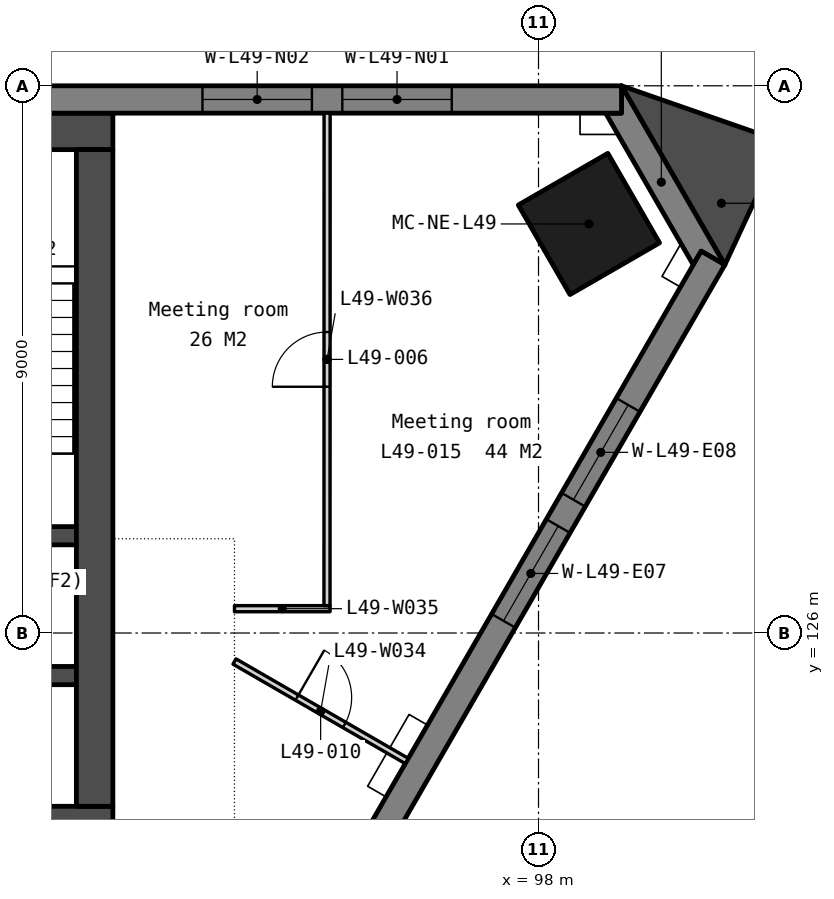
"""IFC4 building model, lengths in metres.
Left out: names, types, materials, properties, quantities, classifications, styles, units other than length and angle.
Written with IfcOpenShell. Run it as: python <this file> out.ifc"""

import sys

from ifc_helpers import new_model, si_unit, direction, frame, frame_2d, origin, origin_2d, place, context, subcontext, project, spatial, polyline, rectangle, outline, extrude, element, fill, save


model = new_model("IFC4")
c1 = context("Model", 3, precision=1e-05, world=origin(), true_north=direction((0.0, 1.0)))
c2 = subcontext(c1, "Body", "Model", "MODEL_VIEW")
j1 = project(units=[si_unit("LENGTHUNIT", "METRE"), si_unit("PLANEANGLEUNIT", "RADIAN")], contexts=[c1])
p1 = place(None, origin())
s1 = spatial("IfcSite", under=j1, at=p1, CompositionType="ELEMENT")
p2 = place(p1, origin())
s2 = spatial("IfcBuilding", under=s1, at=p2, CompositionType="ELEMENT")
p3 = place(p2, frame((0.0, 0.0, 195.8)))
s3 = spatial("IfcBuildingStorey", under=s2, at=p3, CompositionType="ELEMENT", Elevation=195.8)
p4 = place(p3, frame((98.829, 132.728, 0.0), z_axis=(0.0, 0.0, 1.0), x_axis=(-0.5, 0.866025403784, 0.0)))
e1 = element("IfcColumn", 1, at=p4, inside=s3, PredefinedType="COLUMN", context=c2, shape_type="SweptSolid", body=[
    extrude(rectangle(XDim=1.7, YDim=1.7, at=origin_2d()), origin(), (0.0, 0.0, 1.0), 3.9),
])
p5 = place(p3, frame((69.0, 134.25, 0.0), z_axis=(0.0, 0.0, 1.0), x_axis=(1.0, 0.0, 0.0)))
e2 = element("IfcWall", 2, at=p5, inside=s3, PredefinedType="SOLIDWALL", context=c2, shape_type="SweptSolid", body=[
    extrude(rectangle(XDim=22.0, YDim=0.6, at=frame_2d((11.0, 0.0))), origin(), (0.0, 0.0, 1.0), 3.75),
])
p6 = place(p3, frame((69.0, 122.85, 0.0), z_axis=(0.0, 0.0, 1.0), x_axis=(1.0, 0.0, 0.0)))
e3 = element("IfcWall", 3, at=p6, inside=s3, PredefinedType="SOLIDWALL", context=c2, shape_type="SweptSolid", body=[
    extrude(rectangle(XDim=22.0, YDim=0.6, at=frame_2d((11.0, 0.0))), origin(), (0.0, 0.0, 1.0), 3.75),
])
p7 = place(p6, frame((16.375, 0.0, 0.0)))
e4 = element("IfcOpeningElement", 4, at=p7, cuts=e3, PredefinedType="OPENING", context=c2, shape_type="SweptSolid", body=[
    extrude(rectangle(XDim=1.8, YDim=2.1, at=frame_2d((0.9, 1.05))), frame((0.0, 0.31, 0.0), z_axis=(0.0, -1.0, 0.0), x_axis=(1.0, 0.0, 0.0)), (0.0, 0.0, 1.0), 0.62),
])
p8 = place(p6, frame((3.825, 0.0, 0.0)))
e5 = element("IfcOpeningElement", 5, at=p8, cuts=e3, PredefinedType="OPENING", context=c2, shape_type="SweptSolid", body=[
    extrude(rectangle(XDim=1.8, YDim=2.1, at=frame_2d((0.9, 1.05))), frame((0.0, 0.31, 0.0), z_axis=(0.0, -1.0, 0.0), x_axis=(1.0, 0.0, 0.0)), (0.0, 0.0, 1.0), 0.62),
])
p9 = place(p6, frame((12.85, 0.0, 0.0)))
e6 = element("IfcOpeningElement", 6, at=p9, cuts=e3, PredefinedType="OPENING", context=c2, shape_type="SweptSolid", body=[
    extrude(rectangle(XDim=1.5, YDim=2.1, at=frame_2d((0.75, 1.05))), frame((0.0, 0.31, 0.0), z_axis=(0.0, -1.0, 0.0), x_axis=(1.0, 0.0, 0.0)), (0.0, 0.0, 1.0), 0.62),
])
for number, where, z_axis, x_axis in (
    (7, (87.85, 127.6, 0.0), (0.0, 0.0, 1.0), (1.0, 0.0, 0.0)),
    (8, (87.85, 125.3, 0.0), (0.0, 0.0, 1.0), (1.0, 0.0, 0.0)),
):
    element("IfcWall", number, at=place(p3, frame(where, z_axis=z_axis, x_axis=x_axis)), inside=s3, PredefinedType="SOLIDWALL", context=c2, shape_type="SweptSolid", body=[
        extrude(rectangle(XDim=2.55, YDim=0.3, at=frame_2d((1.275, 0.0))), origin(), (0.0, 0.0, 1.0), 3.75),
    ])
p10 = place(p3, frame((90.7, 133.95, 0.0), z_axis=(0.0, 0.0, 1.0), x_axis=(0.0, -1.0, 0.0)))
e9 = element("IfcWall", 9, at=p10, inside=s3, PredefinedType="SOLIDWALL", context=c2, shape_type="SweptSolid", body=[
    extrude(rectangle(XDim=10.8, YDim=0.6, at=frame_2d((5.4, 0.0))), origin(), (0.0, 0.0, 1.0), 3.75),
])
p11 = place(p3, frame((0.0, 0.0, -0.15)))
e10 = element("IfcWall", 10, at=p11, inside=s3, PredefinedType="SOLIDWALL", context=c2, shape_type="SweptSolid", body=[
    extrude(outline(polyline([(101.065, 132.055), (100.675, 132.281), (100.545, 132.055), (99.105, 134.55), (99.365, 134.55), (99.365, 135.0), (101.065, 132.055)])), origin(), (0.0, 0.0, 1.0), 3.9),
])
p12 = place(p3, frame((99.365, 134.775, -0.15), z_axis=(0.0, 0.0, 1.0), x_axis=(-1.0, 0.0, 0.0)))
e11 = element("IfcWall", 11, at=p12, inside=s3, PredefinedType="SOLIDWALL", context=c2, shape_type="SweptSolid", body=[
    extrude(outline(polyline([(0.0, 0.0), (0.0, 3.9), (31.988, 3.9), (31.988, 0.0), (0.0, 0.0)])), frame((0.0, 0.225, 0.0), z_axis=(0.0, -1.0, 0.0), x_axis=(1.0, 0.0, 0.0)), (0.0, 0.0, 1.0), 0.45),
])
p13 = place(p12, frame((2.791, 0.0, 0.95)))
e12 = element("IfcOpeningElement", 12, at=p13, cuts=e11, PredefinedType="OPENING", context=c2, shape_type="SweptSolid", body=[
    extrude(rectangle(XDim=1.8, YDim=2.2, at=frame_2d((0.9, 1.1))), frame((0.0, 0.235, 0.0), z_axis=(0.0, -1.0, 0.0), x_axis=(1.0, 0.0, 0.0)), (0.0, 0.0, 1.0), 0.47),
])
p14 = place(p12, frame((5.091, 0.0, 0.95)))
e13 = element("IfcOpeningElement", 13, at=p14, cuts=e11, PredefinedType="OPENING", context=c2, shape_type="SweptSolid", body=[
    extrude(rectangle(XDim=1.8, YDim=2.2, at=frame_2d((0.9, 1.1))), frame((0.0, 0.235, 0.0), z_axis=(0.0, -1.0, 0.0), x_axis=(1.0, 0.0, 0.0)), (0.0, 0.0, 1.0), 0.47),
])
p15 = place(p12, frame((12.473, 0.0, 0.95)))
e14 = element("IfcOpeningElement", 14, at=p15, cuts=e11, PredefinedType="OPENING", context=c2, shape_type="SweptSolid", body=[
    extrude(rectangle(XDim=1.8, YDim=2.2, at=frame_2d((0.9, 1.1))), frame((0.0, 0.235, 0.0), z_axis=(0.0, -1.0, 0.0), x_axis=(1.0, 0.0, 0.0)), (0.0, 0.0, 1.0), 0.47),
])
p16 = place(p12, frame((14.773, 0.0, 0.95)))
e15 = element("IfcOpeningElement", 15, at=p16, cuts=e11, PredefinedType="OPENING", context=c2, shape_type="SweptSolid", body=[
    extrude(rectangle(XDim=1.8, YDim=2.2, at=frame_2d((0.9, 1.1))), frame((0.0, 0.235, 0.0), z_axis=(0.0, -1.0, 0.0), x_axis=(1.0, 0.0, 0.0)), (0.0, 0.0, 1.0), 0.47),
])
p17 = place(p12, frame((22.156, 0.0, 0.95)))
e16 = element("IfcOpeningElement", 16, at=p17, cuts=e11, PredefinedType="OPENING", context=c2, shape_type="SweptSolid", body=[
    extrude(rectangle(XDim=1.8, YDim=2.2, at=frame_2d((0.9, 1.1))), frame((0.0, 0.235, 0.0), z_axis=(0.0, -1.0, 0.0), x_axis=(1.0, 0.0, 0.0)), (0.0, 0.0, 1.0), 0.47),
])
p18 = place(p12, frame((24.456, 0.0, 0.95)))
e17 = element("IfcOpeningElement", 17, at=p18, cuts=e11, PredefinedType="OPENING", context=c2, shape_type="SweptSolid", body=[
    extrude(rectangle(XDim=1.8, YDim=2.2, at=frame_2d((0.9, 1.1))), frame((0.0, 0.235, 0.0), z_axis=(0.0, -1.0, 0.0), x_axis=(1.0, 0.0, 0.0)), (0.0, 0.0, 1.0), 0.47),
])
p19 = place(p3, frame((81.505, 98.627, -0.15), z_axis=(0.0, 0.0, 1.0), x_axis=(0.500002199942, 0.866024133644, 0.0)))
e18 = element("IfcWall", 18, at=p19, inside=s3, PredefinedType="SOLIDWALL", context=c2, shape_type="SweptSolid", body=[
    extrude(outline(polyline([(38.729, 0.0), (38.729, 3.9), (0.0, 3.9), (0.0, 0.0), (38.729, 0.0)])), frame((0.0, 0.225, 0.0), z_axis=(0.0, -1.0, 0.0), x_axis=(1.0, 0.0, 0.0)), (0.0, 0.0, 1.0), 0.45),
])
p20 = place(p19, frame((2.791, 0.0, 0.95)))
e19 = element("IfcOpeningElement", 19, at=p20, cuts=e18, PredefinedType="OPENING", context=c2, shape_type="SweptSolid", body=[
    extrude(rectangle(XDim=1.8, YDim=2.2, at=frame_2d((0.9, 1.1))), frame((0.0, 0.235, 0.0), z_axis=(0.0, -1.0, 0.0), x_axis=(1.0, 0.0, 0.0)), (0.0, 0.0, 1.0), 0.47),
])
p21 = place(p19, frame((5.091, 0.0, 0.95)))
e20 = element("IfcOpeningElement", 20, at=p21, cuts=e18, PredefinedType="OPENING", context=c2, shape_type="SweptSolid", body=[
    extrude(rectangle(XDim=1.8, YDim=2.2, at=frame_2d((0.9, 1.1))), frame((0.0, 0.235, 0.0), z_axis=(0.0, -1.0, 0.0), x_axis=(1.0, 0.0, 0.0)), (0.0, 0.0, 1.0), 0.47),
])
p22 = place(p19, frame((12.473, 0.0, 0.95)))
e21 = element("IfcOpeningElement", 21, at=p22, cuts=e18, PredefinedType="OPENING", context=c2, shape_type="SweptSolid", body=[
    extrude(rectangle(XDim=1.8, YDim=2.2, at=frame_2d((0.9, 1.1))), frame((0.0, 0.235, 0.0), z_axis=(0.0, -1.0, 0.0), x_axis=(1.0, 0.0, 0.0)), (0.0, 0.0, 1.0), 0.47),
])
p23 = place(p19, frame((14.773, 0.0, 0.95)))
e22 = element("IfcOpeningElement", 22, at=p23, cuts=e18, PredefinedType="OPENING", context=c2, shape_type="SweptSolid", body=[
    extrude(rectangle(XDim=1.8, YDim=2.2, at=frame_2d((0.9, 1.1))), frame((0.0, 0.235, 0.0), z_axis=(0.0, -1.0, 0.0), x_axis=(1.0, 0.0, 0.0)), (0.0, 0.0, 1.0), 0.47),
])
p24 = place(p19, frame((22.156, 0.0, 0.95)))
e23 = element("IfcOpeningElement", 23, at=p24, cuts=e18, PredefinedType="OPENING", context=c2, shape_type="SweptSolid", body=[
    extrude(rectangle(XDim=1.8, YDim=2.2, at=frame_2d((0.9, 1.1))), frame((0.0, 0.235, 0.0), z_axis=(0.0, -1.0, 0.0), x_axis=(1.0, 0.0, 0.0)), (0.0, 0.0, 1.0), 0.47),
])
p25 = place(p19, frame((24.456, 0.0, 0.95)))
e24 = element("IfcOpeningElement", 24, at=p25, cuts=e18, PredefinedType="OPENING", context=c2, shape_type="SweptSolid", body=[
    extrude(rectangle(XDim=1.8, YDim=2.2, at=frame_2d((0.9, 1.1))), frame((0.0, 0.235, 0.0), z_axis=(0.0, -1.0, 0.0), x_axis=(1.0, 0.0, 0.0)), (0.0, 0.0, 1.0), 0.47),
])
p26 = place(p19, frame((31.838, 0.0, 0.95)))
e25 = element("IfcOpeningElement", 25, at=p26, cuts=e18, PredefinedType="OPENING", context=c2, shape_type="SweptSolid", body=[
    extrude(rectangle(XDim=1.8, YDim=2.2, at=frame_2d((0.9, 1.1))), frame((0.0, 0.235, 0.0), z_axis=(0.0, -1.0, 0.0), x_axis=(1.0, 0.0, 0.0)), (0.0, 0.0, 1.0), 0.47),
])
p27 = place(p19, frame((34.138, 0.0, 0.95)))
e26 = element("IfcOpeningElement", 26, at=p27, cuts=e18, PredefinedType="OPENING", context=c2, shape_type="SweptSolid", body=[
    extrude(rectangle(XDim=1.8, YDim=2.2, at=frame_2d((0.9, 1.1))), frame((0.0, 0.235, 0.0), z_axis=(0.0, -1.0, 0.0), x_axis=(1.0, 0.0, 0.0)), (0.0, 0.0, 1.0), 0.47),
])
p28 = place(p3, frame((0.0, 0.0, -0.15)))
e27 = element("IfcWall", 27, at=p28, inside=s3, PredefinedType="SOLIDWALL", context=c2, shape_type="SweptSolid", body=[
    extrude(outline(polyline([(101.065, 132.055), (102.006, 134.081), (99.365, 135.0), (101.065, 132.055)])), origin(), (0.0, 0.0, 1.0), 3.9),
])
p29 = place(p3, frame((93.0, 125.531, 0.0), z_axis=(0.0, 0.0, 1.0), x_axis=(0.866035243948, -0.499982955949, 0.0)))
e28 = element("IfcWall", 28, at=p29, inside=s3, PredefinedType="PARTITIONING", context=c2, shape_type="SweptSolid", body=[
    extrude(rectangle(XDim=3.272, YDim=0.1, at=frame_2d((1.636, 0.0))), origin(), (0.0, 0.0, 1.0), 3.75),
])
p30 = place(p29, frame((1.186, 0.0, 0.0)))
e29 = element("IfcOpeningElement", 29, at=p30, cuts=e28, PredefinedType="OPENING", context=c2, shape_type="SweptSolid", body=[
    extrude(rectangle(XDim=0.9, YDim=2.1, at=frame_2d((0.45, 1.05))), frame((0.0, 0.06, 0.0), z_axis=(0.0, -1.0, 0.0), x_axis=(1.0, 0.0, 0.0)), (0.0, 0.0, 1.0), 0.12),
])
p31 = place(p3, frame((93.0, 126.4, 0.0), z_axis=(0.0, 0.0, 1.0), x_axis=(1.0, 0.0, 0.0)))
e30 = element("IfcWall", 30, at=p31, inside=s3, PredefinedType="PARTITIONING", context=c2, shape_type="SweptSolid", body=[
    extrude(rectangle(XDim=1.572, YDim=0.1, at=frame_2d((0.786, 0.0))), origin(), (0.0, 0.0, 1.0), 3.75),
])
p32 = place(p3, frame((94.521, 126.45, 0.0), z_axis=(0.0, 0.0, 1.0), x_axis=(0.000241123629, 0.99999997093, 0.0)))
e31 = element("IfcWall", 31, at=p32, inside=s3, PredefinedType="PARTITIONING", context=c2, shape_type="SweptSolid", body=[
    extrude(rectangle(XDim=8.1, YDim=0.1, at=frame_2d((4.05, 0.0))), origin(), (0.0, 0.0, 1.0), 3.75),
])
p33 = place(p32, frame((3.6, 0.0, 0.0)))
e32 = element("IfcOpeningElement", 32, at=p33, cuts=e31, PredefinedType="OPENING", context=c2, shape_type="SweptSolid", body=[
    extrude(rectangle(XDim=0.9, YDim=2.1, at=frame_2d((0.45, 1.05))), frame((0.0, 0.06, 0.0), z_axis=(0.0, -1.0, 0.0), x_axis=(1.0, 0.0, 0.0)), (0.0, 0.0, 1.0), 0.12),
])
p34 = place(p13, origin())
e33 = element("IfcWindow", 33, at=p34, inside=s3, PartitioningType="SINGLE_PANEL", PredefinedType="WINDOW", context=c2, shape_type="SweptSolid", body=[
    extrude(rectangle(XDim=1.8, YDim=2.2, at=frame_2d((0.9, 1.1))), frame((0.0, 0.03, 0.0), z_axis=(0.0, -1.0, 0.0), x_axis=(1.0, 0.0, 0.0)), (0.0, 0.0, 1.0), 0.06),
])
fill(e12, e33)
p35 = place(p14, origin())
e34 = element("IfcWindow", 34, at=p35, inside=s3, PartitioningType="SINGLE_PANEL", PredefinedType="WINDOW", context=c2, shape_type="SweptSolid", body=[
    extrude(rectangle(XDim=1.8, YDim=2.2, at=frame_2d((0.9, 1.1))), frame((0.0, 0.03, 0.0), z_axis=(0.0, -1.0, 0.0), x_axis=(1.0, 0.0, 0.0)), (0.0, 0.0, 1.0), 0.06),
])
fill(e13, e34)
p36 = place(p26, origin())
e35 = element("IfcWindow", 35, at=p36, inside=s3, PartitioningType="SINGLE_PANEL", PredefinedType="WINDOW", context=c2, shape_type="SweptSolid", body=[
    extrude(rectangle(XDim=1.8, YDim=2.2, at=frame_2d((0.9, 1.1))), frame((0.0, 0.03, 0.0), z_axis=(0.0, -1.0, 0.0), x_axis=(1.0, 0.0, 0.0)), (0.0, 0.0, 1.0), 0.06),
])
fill(e25, e35)
p37 = place(p27, origin())
e36 = element("IfcWindow", 36, at=p37, inside=s3, PartitioningType="SINGLE_PANEL", PredefinedType="WINDOW", context=c2, shape_type="SweptSolid", body=[
    extrude(rectangle(XDim=1.8, YDim=2.2, at=frame_2d((0.9, 1.1))), frame((0.0, 0.03, 0.0), z_axis=(0.0, -1.0, 0.0), x_axis=(1.0, 0.0, 0.0)), (0.0, 0.0, 1.0), 0.06),
])
fill(e26, e36)
p38 = place(p33, origin())
e37 = element("IfcDoor", 37, at=p38, inside=s3, OperationType="SINGLE_SWING_LEFT", PredefinedType="DOOR", context=c2, shape_type="SweptSolid", body=[
    extrude(rectangle(XDim=0.9, YDim=2.1, at=frame_2d((0.45, 1.05))), frame((0.0, 0.025, 0.0), z_axis=(0.0, -1.0, 0.0), x_axis=(1.0, 0.0, 0.0)), (0.0, 0.0, 1.0), 0.05),
])
fill(e32, e37)
p39 = place(p30, origin())
e38 = element("IfcDoor", 38, at=p39, inside=s3, OperationType="SINGLE_SWING_LEFT", PredefinedType="DOOR", context=c2, shape_type="SweptSolid", body=[
    extrude(rectangle(XDim=0.9, YDim=2.1, at=frame_2d((0.45, 1.05))), frame((0.0, 0.025, 0.0), z_axis=(0.0, -1.0, 0.0), x_axis=(1.0, 0.0, 0.0)), (0.0, 0.0, 1.0), 0.05),
])
fill(e29, e38)
save(model, sys.argv[1])
